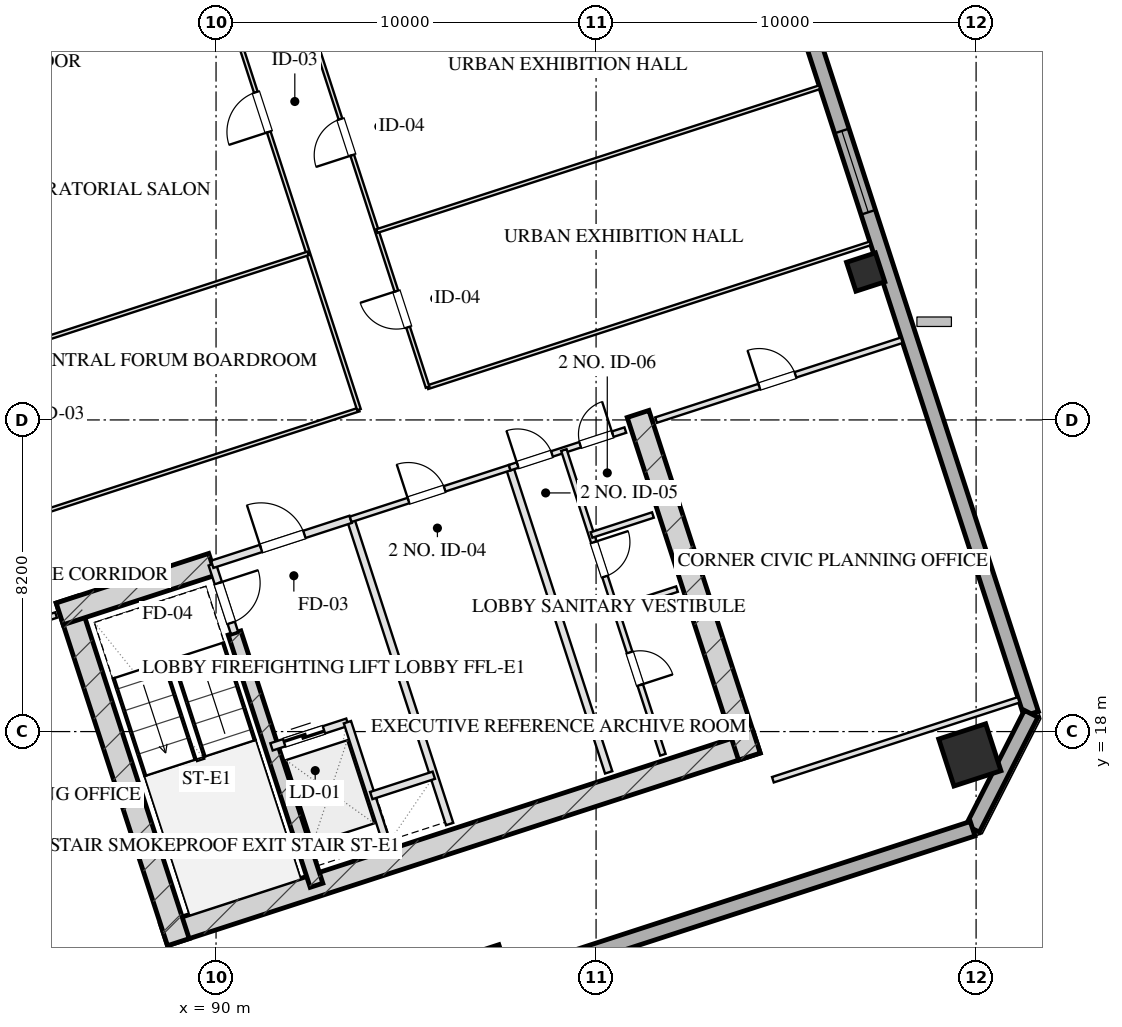
"""IFC4 building model, lengths in metres.
Left out: names, types, materials, properties, quantities, classifications, styles, units other than length and angle.
Written with IfcOpenShell. Run it as: python <this file> out.ifc"""

import sys

from ifc_helpers import new_model, si_unit, direction, frame, frame_2d, origin, origin_2d, place, context, subcontext, project, spatial, rectangle, hollow_rectangle, extrude, element, fill, save


model = new_model("IFC4")
c1 = context("Model", 3, precision=1e-05, world=origin(), true_north=direction((0.0, 1.0)))
c2 = subcontext(c1, "Body", "Model", "MODEL_VIEW")
j1 = project(units=[si_unit("LENGTHUNIT", "METRE"), si_unit("PLANEANGLEUNIT", "RADIAN")], contexts=[c1])
p1 = place(None, origin())
s1 = spatial("IfcSite", under=j1, at=p1, CompositionType="ELEMENT")
p2 = place(p1, origin())
s2 = spatial("IfcBuilding", under=s1, at=p2, CompositionType="ELEMENT")
p3 = place(p2, frame((0.0, 0.0, 142.6)))
s3 = spatial("IfcBuildingStorey", under=s2, at=p3, CompositionType="ELEMENT", Elevation=142.6)
p4 = place(p3, frame((88.63, 12.652, 0.0), z_axis=(0.0, 0.0, 1.0), x_axis=(0.95105714907, 0.309015046886, 0.0)))
e1 = element("IfcWall", 1, at=p4, inside=s3, PredefinedType="SHEAR", context=c2, shape_type="SweptSolid", body=[
    extrude(rectangle(XDim=16.4, YDim=0.6, at=frame_2d((8.2, 0.0))), origin(), (0.0, 0.0, 1.0), 3.45),
])
p5 = place(p3, frame((86.078, 21.475, 0.0), z_axis=(0.0, 0.0, 1.0), x_axis=(0.309017938678, -0.951056209472, 0.0)))
e2 = element("IfcWall", 2, at=p5, inside=s3, PredefinedType="SHEAR", context=c2, shape_type="SweptSolid", body=[
    extrude(rectangle(XDim=9.48, YDim=0.6, at=frame_2d((4.74, 0.0))), origin(), (0.0, 0.0, 1.0), 3.45),
])
p6 = place(p3, frame((101.105, 26.358, 0.0), z_axis=(0.0, 0.0, 1.0), x_axis=(0.309010370028, -0.95105866865, 0.0)))
e3 = element("IfcWall", 3, at=p6, inside=s3, PredefinedType="SHEAR", context=c2, shape_type="SweptSolid", body=[
    extrude(rectangle(XDim=9.48, YDim=0.6, at=frame_2d((4.74, 0.0))), origin(), (0.0, 0.0, 1.0), 3.45),
])
p7 = place(p3, frame((90.486, 20.594, 0.0), z_axis=(0.0, 0.0, 1.0), x_axis=(0.309020428229, -0.951055400562, 0.0)))
e4 = element("IfcWall", 4, at=p7, inside=s3, PredefinedType="SHEAR", context=c2, shape_type="SweptSolid", body=[
    extrude(rectangle(XDim=6.98, YDim=0.35, at=frame_2d((3.49, 0.0))), origin(), (0.0, 0.0, 1.0), 3.45),
])
p8 = place(p3, frame((85.886, 21.097, 0.0), z_axis=(0.0, 0.0, 1.0), x_axis=(0.951068073652, 0.308981422225, 0.0)))
e5 = element("IfcWall", 5, at=p8, inside=s3, PredefinedType="SHEAR", context=c2, shape_type="SweptSolid", body=[
    extrude(rectangle(XDim=4.22, YDim=0.6, at=frame_2d((2.11, 0.0))), origin(), (0.0, 0.0, 1.0), 3.45),
])
p9 = place(p3, frame((109.835, 17.386, 0.0), z_axis=(0.0, 0.0, 1.0), x_axis=(0.951056516295, 0.309016994375, 0.0)))
e6 = element("IfcColumn", 6, at=p9, inside=s3, PredefinedType="COLUMN", context=c2, shape_type="SweptSolid", body=[
    extrude(hollow_rectangle(XDim=1.3, YDim=1.3, WallThickness=0.045, at=origin_2d()), origin(), (0.0, 0.0, 1.0), 3.451),
])
for number, where, z_axis, x_axis in (
    (7, (107.094, 30.091, 0.0), (0.0, 0.0, 1.0), (0.951, 0.309, 0.0)),
    (8, (97.185, 11.888, 0.0), (0.0, 0.0, 1.0), (0.951, 0.309, 0.0)),
):
    element("IfcColumn", number, at=place(p3, frame(where, z_axis=z_axis, x_axis=x_axis)), inside=s3, PredefinedType="COLUMN", context=c2, shape_type="SweptSolid", body=[
        extrude(hollow_rectangle(XDim=0.8, YDim=0.8, WallThickness=0.028, at=origin_2d()), origin(), (0.0, 0.0, 1.0), 3.451),
    ])
p10 = place(p3, frame((98.224, 59.173, 0.0), z_axis=(0.0, 0.0, 1.0), x_axis=(0.309014228706, -0.951057414911, 0.0)))
e9 = element("IfcWall", 9, at=p10, inside=s3, PredefinedType="SOLIDWALL", context=c2, shape_type="SweptSolid", body=[
    extrude(rectangle(XDim=42.8, YDim=0.4, at=frame_2d((21.4, 0.0))), origin(), (0.0, 0.0, 1.0), 2.61),
])
p11 = place(p10, frame((26.675, 0.0, 0.75)))
e10 = element("IfcOpeningElement", 10, at=p11, cuts=e9, PredefinedType="OPENING", context=c2, shape_type="SweptSolid", body=[
    extrude(rectangle(XDim=2.25, YDim=1.46, at=frame_2d((1.125, 0.73))), frame((0.0, 0.21, 0.0), z_axis=(0.0, -1.0, 0.0), x_axis=(1.0, 0.0, 0.0)), (0.0, 0.0, 1.0), 0.42),
])
p12 = place(p10, frame((16.45, 0.0, 0.0)))
e11 = element("IfcOpeningElement", 11, at=p12, cuts=e9, PredefinedType="OPENING", context=c2, shape_type="SweptSolid", body=[
    extrude(rectangle(XDim=1.1, YDim=2.15, at=frame_2d((0.55, 1.075))), frame((0.0, 0.21, 0.0), z_axis=(0.0, -1.0, 0.0), x_axis=(1.0, 0.0, 0.0)), (0.0, 0.0, 1.0), 0.42),
])
p13 = place(p3, frame((111.449, 18.468, 0.0), z_axis=(0.0, 0.0, 1.0), x_axis=(-0.454019523198, -0.890991735402, 0.0)))
e12 = element("IfcWall", 12, at=p13, inside=s3, PredefinedType="SOLIDWALL", context=c2, shape_type="SweptSolid", body=[
    extrude(rectangle(XDim=3.394, YDim=0.4, at=frame_2d((1.697, 0.0))), origin(), (0.0, 0.0, 1.0), 2.61),
])
p14 = place(p3, frame((109.908, 15.444, 0.0), z_axis=(0.0, 0.0, 1.0), x_axis=(-0.951057580055, -0.30901372044, 0.0)))
e13 = element("IfcWall", 13, at=p14, inside=s3, PredefinedType="SOLIDWALL", context=c2, shape_type="SweptSolid", body=[
    extrude(rectangle(XDim=26.4, YDim=0.4, at=frame_2d((13.2, 0.0))), origin(), (0.0, 0.0, 1.0), 2.61),
])
p15 = place(p3, frame((89.899, 22.401, 0.0), z_axis=(0.0, 0.0, 1.0), x_axis=(0.308932062672, -0.951084108086, 0.0)))
e14 = element("IfcWall", 14, at=p15, inside=s3, PredefinedType="PARTITIONING", context=c2, shape_type="SweptSolid", body=[
    extrude(rectangle(XDim=1.9, YDim=0.2, at=frame_2d((0.95, 0.0))), origin(), (0.0, 0.0, 1.0), 3.175),
])
p16 = place(p15, frame((0.52, 0.0, 0.0)))
e15 = element("IfcOpeningElement", 15, at=p16, cuts=e14, PredefinedType="OPENING", context=c2, shape_type="SweptSolid", body=[
    extrude(rectangle(XDim=1.1, YDim=2.05, at=frame_2d((0.55, 1.025))), frame((0.0, 0.11, 0.0), z_axis=(0.0, -1.0, 0.0), x_axis=(1.0, 0.0, 0.0)), (0.0, 0.0, 1.0), 0.22),
])
p17 = place(p3, frame((93.542, 23.585, 0.0), z_axis=(0.0, 0.0, 1.0), x_axis=(0.309042196757, -0.951048327176, 0.0)))
e16 = element("IfcWall", 16, at=p17, inside=s3, PredefinedType="PARTITIONING", context=c2, shape_type="SweptSolid", body=[
    extrude(rectangle(XDim=8.43, YDim=0.2, at=frame_2d((4.215, 0.0))), origin(), (0.0, 0.0, 1.0), 3.175),
])
p18 = place(p3, frame((89.899, 22.401, 0.0), z_axis=(0.0, 0.0, 1.0), x_axis=(0.951046716504, 0.309047153403, 0.0)))
e17 = element("IfcWall", 17, at=p18, inside=s3, PredefinedType="PARTITIONING", context=c2, shape_type="SweptSolid", body=[
    extrude(rectangle(XDim=3.83, YDim=0.2, at=frame_2d((1.915, 0.0))), origin(), (0.0, 0.0, 1.0), 3.175),
])
p19 = place(p18, frame((1.35, 0.0, 0.0)))
e18 = element("IfcOpeningElement", 18, at=p19, cuts=e17, PredefinedType="OPENING", context=c2, shape_type="SweptSolid", body=[
    extrude(rectangle(XDim=1.2, YDim=2.05, at=frame_2d((0.6, 1.025))), frame((0.0, 0.11, 0.0), z_axis=(0.0, -1.0, 0.0), x_axis=(1.0, 0.0, 0.0)), (0.0, 0.0, 1.0), 0.22),
])
p20 = place(p3, frame((91.46, 17.598, 0.0), z_axis=(0.0, 0.0, 1.0), x_axis=(0.951062257173, 0.308999325213, 0.0)))
e19 = element("IfcWall", 19, at=p20, inside=s3, PredefinedType="PARTITIONING", context=c2, shape_type="SweptSolid", body=[
    extrude(rectangle(XDim=2.1, YDim=0.2, at=frame_2d((1.05, 0.0))), origin(), (0.0, 0.0, 1.0), 3.175),
])
p21 = place(p20, frame((0.35, 0.0, 0.0)))
e20 = element("IfcOpeningElement", 20, at=p21, cuts=e19, PredefinedType="OPENING", context=c2, shape_type="SweptSolid", body=[
    extrude(rectangle(XDim=1.1, YDim=2.05, at=frame_2d((0.55, 1.025))), frame((0.0, 0.11, 0.0), z_axis=(0.0, -1.0, 0.0), x_axis=(1.0, 0.0, 0.0)), (0.0, 0.0, 1.0), 0.22),
])
p22 = place(p3, frame((93.457, 18.247, 0.0), z_axis=(0.0, 0.0, 1.0), x_axis=(0.3089935693, -0.951064127245, 0.0)))
e21 = element("IfcWall", 21, at=p22, inside=s3, PredefinedType="PARTITIONING", context=c2, shape_type="SweptSolid", body=[
    extrude(rectangle(XDim=3.7, YDim=0.2, at=frame_2d((1.85, 0.0))), origin(), (0.0, 0.0, 1.0), 3.175),
])
p23 = place(p3, frame((94.084, 16.317, 0.0), z_axis=(0.0, 0.0, 1.0), x_axis=(0.951041328149, 0.309063734775, 0.0)))
e22 = element("IfcWall", 22, at=p23, inside=s3, PredefinedType="PARTITIONING", context=c2, shape_type="SweptSolid", body=[
    extrude(rectangle(XDim=1.73, YDim=0.2, at=frame_2d((0.865, 0.0))), origin(), (0.0, 0.0, 1.0), 3.175),
])
p24 = place(p3, frame((97.727, 24.944, 0.0), z_axis=(0.0, 0.0, 1.0), x_axis=(0.309016001439, -0.951056838919, 0.0)))
e23 = element("IfcWall", 23, at=p24, inside=s3, PredefinedType="PARTITIONING", context=c2, shape_type="SweptSolid", body=[
    extrude(rectangle(XDim=8.43, YDim=0.2, at=frame_2d((4.215, 0.0))), origin(), (0.0, 0.0, 1.0), 3.175),
])
p25 = place(p3, frame((93.542, 23.585, 0.0), z_axis=(0.0, 0.0, 1.0), x_axis=(0.951063829732, 0.308994485023, 0.0)))
e24 = element("IfcWall", 24, at=p25, inside=s3, PredefinedType="PARTITIONING", context=c2, shape_type="SweptSolid", body=[
    extrude(rectangle(XDim=4.4, YDim=0.15, at=frame_2d((2.2, 0.0))), origin(), (0.0, 0.0, 1.0), 3.175),
])
p26 = place(p25, frame((1.6, 0.0, 0.0)))
e25 = element("IfcOpeningElement", 25, at=p26, cuts=e24, PredefinedType="OPENING", context=c2, shape_type="SweptSolid", body=[
    extrude(rectangle(XDim=1.0, YDim=2.05, at=frame_2d((0.5, 1.025))), frame((0.0, 0.085, 0.0), z_axis=(0.0, -1.0, 0.0), x_axis=(1.0, 0.0, 0.0)), (0.0, 0.0, 1.0), 0.17),
])
p27 = place(p3, frame((97.727, 24.944, 0.0), z_axis=(0.0, 0.0, 1.0), x_axis=(0.951036872128, 0.309077446369, 0.0)))
e26 = element("IfcWall", 26, at=p27, inside=s3, PredefinedType="PARTITIONING", context=c2, shape_type="SweptSolid", body=[
    extrude(rectangle(XDim=3.2, YDim=0.15, at=frame_2d((1.6, 0.0))), origin(), (0.0, 0.0, 1.0), 3.175),
])
p28 = place(p27, frame((0.22, 0.0, 0.0)))
e27 = element("IfcOpeningElement", 27, at=p28, cuts=e26, PredefinedType="OPENING", context=c2, shape_type="SweptSolid", body=[
    extrude(rectangle(XDim=0.95, YDim=2.05, at=frame_2d((0.475, 1.025))), frame((0.0, 0.085, 0.0), z_axis=(0.0, -1.0, 0.0), x_axis=(1.0, 0.0, 0.0)), (0.0, 0.0, 1.0), 0.17),
])
p29 = place(p27, frame((1.95, 0.0, 0.0)))
e28 = element("IfcOpeningElement", 28, at=p29, cuts=e26, PredefinedType="OPENING", context=c2, shape_type="SweptSolid", body=[
    extrude(rectangle(XDim=0.9, YDim=2.05, at=frame_2d((0.45, 1.025))), frame((0.0, 0.085, 0.0), z_axis=(0.0, -1.0, 0.0), x_axis=(1.0, 0.0, 0.0)), (0.0, 0.0, 1.0), 0.17),
])
p30 = place(p3, frame((99.153, 25.408, 0.0), z_axis=(0.0, 0.0, 1.0), x_axis=(0.309016001439, -0.951056838919, 0.0)))
e29 = element("IfcWall", 29, at=p30, inside=s3, PredefinedType="PARTITIONING", context=c2, shape_type="SweptSolid", body=[
    extrude(rectangle(XDim=8.43, YDim=0.15, at=frame_2d((4.215, 0.0))), origin(), (0.0, 0.0, 1.0), 3.175),
])
p31 = place(p30, frame((2.55, 0.0, 0.0)))
e30 = element("IfcOpeningElement", 30, at=p31, cuts=e29, PredefinedType="OPENING", context=c2, shape_type="SweptSolid", body=[
    extrude(rectangle(XDim=0.95, YDim=2.05, at=frame_2d((0.475, 1.025))), frame((0.0, 0.085, 0.0), z_axis=(0.0, -1.0, 0.0), x_axis=(1.0, 0.0, 0.0)), (0.0, 0.0, 1.0), 0.17),
])
p32 = place(p30, frame((5.6, 0.0, 0.0)))
e31 = element("IfcOpeningElement", 31, at=p32, cuts=e29, PredefinedType="OPENING", context=c2, shape_type="SweptSolid", body=[
    extrude(rectangle(XDim=0.9, YDim=2.05, at=frame_2d((0.45, 1.025))), frame((0.0, 0.085, 0.0), z_axis=(0.0, -1.0, 0.0), x_axis=(1.0, 0.0, 0.0)), (0.0, 0.0, 1.0), 0.17),
])
for number, where, z_axis, x_axis in (
    (32, (100.513, 21.223, 0.0), (0.0, 0.0, 1.0), (0.951, 0.309, 0.0)),
    (33, (99.879, 23.173, 0.0), (0.0, 0.0, 1.0), (0.951, 0.309, 0.0)),
):
    element("IfcWall", number, at=place(p3, frame(where, z_axis=z_axis, x_axis=x_axis)), inside=s3, PredefinedType="PARTITIONING", context=c2, shape_type="SweptSolid", body=[
        extrude(rectangle(XDim=1.7, YDim=0.15, at=frame_2d((0.85, 0.0))), origin(), (0.0, 0.0, 1.0), 3.175),
    ])
p33 = place(p3, frame((78.753, 18.78, 0.0), z_axis=(0.0, 0.0, 1.0), x_axis=(0.951060977215, 0.309003264738, 0.0)))
e34 = element("IfcWall", 34, at=p33, inside=s3, PredefinedType="PARTITIONING", context=c2, shape_type="SweptSolid", body=[
    extrude(rectangle(XDim=7.4, YDim=0.15, at=frame_2d((3.7, 0.0))), origin(), (0.0, 0.0, 1.0), 3.175),
])
p34 = place(p33, frame((3.108, 0.0, 0.0)))
e35 = element("IfcOpeningElement", 35, at=p34, cuts=e34, PredefinedType="OPENING", context=c2, shape_type="SweptSolid", body=[
    extrude(rectangle(XDim=1.0, YDim=2.05, at=frame_2d((0.5, 1.025))), frame((0.0, 0.085, 0.0), z_axis=(0.0, -1.0, 0.0), x_axis=(1.0, 0.0, 0.0)), (0.0, 0.0, 1.0), 0.17),
])
p35 = place(p3, frame((104.653, 16.733, 0.0), z_axis=(0.0, 0.0, 1.0), x_axis=(0.951054383043, 0.309023559774, 0.0)))
e36 = element("IfcWall", 36, at=p35, inside=s3, PredefinedType="PARTITIONING", context=c2, shape_type="SweptSolid", body=[
    extrude(rectangle(XDim=6.8, YDim=0.15, at=frame_2d((3.4, 0.0))), origin(), (0.0, 0.0, 1.0), 3.175),
])
p36 = place(p3, frame((101.578, 26.196, 0.0), z_axis=(0.0, 0.0, 1.0), x_axis=(0.951064934653, 0.308991084134, 0.0)))
e37 = element("IfcWall", 37, at=p36, inside=s3, PredefinedType="PARTITIONING", context=c2, shape_type="SweptSolid", body=[
    extrude(rectangle(XDim=6.8, YDim=0.15, at=frame_2d((3.4, 0.0))), origin(), (0.0, 0.0, 1.0), 3.175),
])
p37 = place(p36, frame((2.856, 0.0, 0.0)))
e38 = element("IfcOpeningElement", 38, at=p37, cuts=e37, PredefinedType="OPENING", context=c2, shape_type="SweptSolid", body=[
    extrude(rectangle(XDim=1.0, YDim=2.05, at=frame_2d((0.5, 1.025))), frame((0.0, 0.085, 0.0), z_axis=(0.0, -1.0, 0.0), x_axis=(1.0, 0.0, 0.0)), (0.0, 0.0, 1.0), 0.17),
])
p38 = place(p3, frame((85.248, 23.708, 0.0), z_axis=(0.0, 0.0, 1.0), x_axis=(0.951059123431, 0.309008970321, 0.0)))
e39 = element("IfcWall", 39, at=p38, inside=s3, PredefinedType="MOVABLE", context=c2, shape_type="SweptSolid", body=[
    extrude(rectangle(XDim=8.95, YDim=0.1, at=frame_2d((4.475, 0.0))), origin(), (0.0, 0.0, 1.0), 3.175),
])
p39 = place(p3, frame((95.567, 27.061, 0.0), z_axis=(0.0, 0.0, 1.0), x_axis=(0.9510516424, 0.30903199428, 0.0)))
e40 = element("IfcWall", 40, at=p39, inside=s3, PredefinedType="MOVABLE", context=c2, shape_type="SweptSolid", body=[
    extrude(rectangle(XDim=12.25, YDim=0.1, at=frame_2d((6.125, 0.0))), origin(), (0.0, 0.0, 1.0), 3.175),
])
p40 = place(p3, frame((93.76, 26.473, 0.0), z_axis=(0.0, 0.0, 1.0), x_axis=(-0.309004459387, 0.951060589068, 0.0)))
e41 = element("IfcWall", 41, at=p40, inside=s3, PredefinedType="MOVABLE", context=c2, shape_type="SweptSolid", body=[
    extrude(rectangle(XDim=16.64, YDim=0.1, at=frame_2d((8.32, 0.0))), origin(), (0.0, 0.0, 1.0), 3.175),
])
p41 = place(p40, frame((7.68, 0.0, 0.0)))
e42 = element("IfcOpeningElement", 42, at=p41, cuts=e41, PredefinedType="OPENING", context=c2, shape_type="SweptSolid", body=[
    extrude(rectangle(XDim=1.1, YDim=2.05, at=frame_2d((0.55, 1.025))), frame((0.0, 0.06, 0.0), z_axis=(0.0, -1.0, 0.0), x_axis=(1.0, 0.0, 0.0)), (0.0, 0.0, 1.0), 0.12),
])
p42 = place(p3, frame((95.567, 27.061, 0.0), z_axis=(0.0, 0.0, 1.0), x_axis=(-0.30901773025, 0.951056277195, 0.0)))
e43 = element("IfcWall", 43, at=p42, inside=s3, PredefinedType="MOVABLE", context=c2, shape_type="SweptSolid", body=[
    extrude(rectangle(XDim=16.64, YDim=0.1, at=frame_2d((8.32, 0.0))), origin(), (0.0, 0.0, 1.0), 3.175),
])
p43 = place(p42, frame((1.66, 0.0, 0.0)))
e44 = element("IfcOpeningElement", 44, at=p43, cuts=e43, PredefinedType="OPENING", context=c2, shape_type="SweptSolid", body=[
    extrude(rectangle(XDim=1.0, YDim=2.05, at=frame_2d((0.5, 1.025))), frame((0.0, 0.06, 0.0), z_axis=(0.0, -1.0, 0.0), x_axis=(1.0, 0.0, 0.0)), (0.0, 0.0, 1.0), 0.12),
])
p44 = place(p42, frame((6.42, 0.0, 0.0)))
e45 = element("IfcOpeningElement", 45, at=p44, cuts=e43, PredefinedType="OPENING", context=c2, shape_type="SweptSolid", body=[
    extrude(rectangle(XDim=1.0, YDim=2.05, at=frame_2d((0.5, 1.025))), frame((0.0, 0.06, 0.0), z_axis=(0.0, -1.0, 0.0), x_axis=(1.0, 0.0, 0.0)), (0.0, 0.0, 1.0), 0.12),
])
p45 = place(p42, frame((12.58, 0.0, 0.0)))
e46 = element("IfcOpeningElement", 46, at=p45, cuts=e43, PredefinedType="OPENING", context=c2, shape_type="SweptSolid", body=[
    extrude(rectangle(XDim=1.0, YDim=2.05, at=frame_2d((0.5, 1.025))), frame((0.0, 0.06, 0.0), z_axis=(0.0, -1.0, 0.0), x_axis=(1.0, 0.0, 0.0)), (0.0, 0.0, 1.0), 0.12),
])
p46 = place(p3, frame((83.913, 27.816, 0.0), z_axis=(0.0, 0.0, 1.0), x_axis=(0.951059123431, 0.309008970321, 0.0)))
e47 = element("IfcWall", 47, at=p46, inside=s3, PredefinedType="MOVABLE", context=c2, shape_type="SweptSolid", body=[
    extrude(rectangle(XDim=8.95, YDim=0.1, at=frame_2d((4.475, 0.0))), origin(), (0.0, 0.0, 1.0), 3.175),
])
p47 = place(p3, frame((81.441, 35.425, 0.0), z_axis=(0.0, 0.0, 1.0), x_axis=(0.951056518616, 0.309016987233, 0.0)))
e48 = element("IfcWall", 48, at=p47, inside=s3, PredefinedType="MOVABLE", context=c2, shape_type="SweptSolid", body=[
    extrude(rectangle(XDim=8.95, YDim=0.1, at=frame_2d((4.475, 0.0))), origin(), (0.0, 0.0, 1.0), 3.175),
])
p48 = place(p3, frame((94.232, 31.169, 0.0), z_axis=(0.0, 0.0, 1.0), x_axis=(0.95105749975, 0.309013967595, 0.0)))
e49 = element("IfcWall", 49, at=p48, inside=s3, PredefinedType="MOVABLE", context=c2, shape_type="SweptSolid", body=[
    extrude(rectangle(XDim=12.25, YDim=0.1, at=frame_2d((6.125, 0.0))), origin(), (0.0, 0.0, 1.0), 3.175),
])
p49 = place(p11, origin())
e50 = element("IfcWindow", 50, at=p49, inside=s3, PartitioningType="TRIPLE_PANEL_VERTICAL", PredefinedType="WINDOW", context=c2, shape_type="SweptSolid", body=[
    extrude(rectangle(XDim=2.25, YDim=1.46, at=frame_2d((1.125, 0.73))), frame((0.0, 0.03, 0.0), z_axis=(0.0, -1.0, 0.0), x_axis=(1.0, 0.0, 0.0)), (0.0, 0.0, 1.0), 0.06),
])
fill(e10, e50)
p50 = place(p16, origin())
e51 = element("IfcDoor", 51, at=p50, inside=s3, OperationType="SINGLE_SWING_LEFT", PredefinedType="DOOR", context=c2, shape_type="SweptSolid", body=[
    extrude(rectangle(XDim=1.1, YDim=2.05, at=frame_2d((0.55, 1.025))), frame((0.0, 0.025, 0.0), z_axis=(0.0, -1.0, 0.0), x_axis=(1.0, 0.0, 0.0)), (0.0, 0.0, 1.0), 0.05),
])
fill(e15, e51)
p51 = place(p19, origin())
e52 = element("IfcDoor", 52, at=p51, inside=s3, OperationType="SINGLE_SWING_LEFT", PredefinedType="DOOR", context=c2, shape_type="SweptSolid", body=[
    extrude(rectangle(XDim=1.2, YDim=2.05, at=frame_2d((0.6, 1.025))), frame((0.0, 0.025, 0.0), z_axis=(0.0, -1.0, 0.0), x_axis=(1.0, 0.0, 0.0)), (0.0, 0.0, 1.0), 0.05),
])
fill(e18, e52)
p52 = place(p21, origin())
e53 = element("IfcDoor", 53, at=p52, inside=s3, OperationType="DOUBLE_DOOR_SLIDING", PredefinedType="DOOR", context=c2, shape_type="SweptSolid", body=[
    extrude(rectangle(XDim=1.1, YDim=2.05, at=frame_2d((0.55, 1.025))), frame((0.0, 0.025, 0.0), z_axis=(0.0, -1.0, 0.0), x_axis=(1.0, 0.0, 0.0)), (0.0, 0.0, 1.0), 0.05),
])
fill(e20, e53)
p53 = place(p26, origin())
e54 = element("IfcDoor", 54, at=p53, inside=s3, OperationType="SINGLE_SWING_LEFT", PredefinedType="DOOR", context=c2, shape_type="SweptSolid", body=[
    extrude(rectangle(XDim=1.0, YDim=2.05, at=frame_2d((0.5, 1.025))), frame((0.0, 0.025, 0.0), z_axis=(0.0, -1.0, 0.0), x_axis=(1.0, 0.0, 0.0)), (0.0, 0.0, 1.0), 0.05),
])
fill(e25, e54)
p54 = place(p28, origin())
e55 = element("IfcDoor", 55, at=p54, inside=s3, OperationType="SINGLE_SWING_LEFT", PredefinedType="DOOR", context=c2, shape_type="SweptSolid", body=[
    extrude(rectangle(XDim=0.95, YDim=2.05, at=frame_2d((0.475, 1.025))), frame((0.0, 0.025, 0.0), z_axis=(0.0, -1.0, 0.0), x_axis=(1.0, 0.0, 0.0)), (0.0, 0.0, 1.0), 0.05),
])
fill(e27, e55)
p55 = place(p29, origin())
e56 = element("IfcDoor", 56, at=p55, inside=s3, OperationType="SINGLE_SWING_RIGHT", PredefinedType="DOOR", context=c2, shape_type="SweptSolid", body=[
    extrude(rectangle(XDim=0.9, YDim=2.05, at=frame_2d((0.45, 1.025))), frame((0.0, 0.025, 0.0), z_axis=(0.0, -1.0, 0.0), x_axis=(1.0, 0.0, 0.0)), (0.0, 0.0, 1.0), 0.05),
])
fill(e28, e56)
p56 = place(p31, origin())
e57 = element("IfcDoor", 57, at=p56, inside=s3, OperationType="SINGLE_SWING_LEFT", PredefinedType="DOOR", context=c2, shape_type="SweptSolid", body=[
    extrude(rectangle(XDim=0.95, YDim=2.05, at=frame_2d((0.475, 1.025))), frame((0.0, 0.025, 0.0), z_axis=(0.0, -1.0, 0.0), x_axis=(1.0, 0.0, 0.0)), (0.0, 0.0, 1.0), 0.05),
])
fill(e30, e57)
p57 = place(p32, origin())
e58 = element("IfcDoor", 58, at=p57, inside=s3, OperationType="SINGLE_SWING_RIGHT", PredefinedType="DOOR", context=c2, shape_type="SweptSolid", body=[
    extrude(rectangle(XDim=0.9, YDim=2.05, at=frame_2d((0.45, 1.025))), frame((0.0, 0.025, 0.0), z_axis=(0.0, -1.0, 0.0), x_axis=(1.0, 0.0, 0.0)), (0.0, 0.0, 1.0), 0.05),
])
fill(e31, e58)
p58 = place(p37, origin())
e59 = element("IfcDoor", 59, at=p58, inside=s3, OperationType="SINGLE_SWING_LEFT", PredefinedType="DOOR", context=c2, shape_type="SweptSolid", body=[
    extrude(rectangle(XDim=1.0, YDim=2.05, at=frame_2d((0.5, 1.025))), frame((0.0, 0.025, 0.0), z_axis=(0.0, -1.0, 0.0), x_axis=(1.0, 0.0, 0.0)), (0.0, 0.0, 1.0), 0.05),
])
fill(e38, e59)
p59 = place(p41, origin())
e60 = element("IfcDoor", 60, at=p59, inside=s3, OperationType="SINGLE_SWING_LEFT", PredefinedType="DOOR", context=c2, shape_type="SweptSolid", body=[
    extrude(rectangle(XDim=1.1, YDim=2.05, at=frame_2d((0.55, 1.025))), frame((0.0, 0.025, 0.0), z_axis=(0.0, -1.0, 0.0), x_axis=(1.0, 0.0, 0.0)), (0.0, 0.0, 1.0), 0.05),
])
fill(e42, e60)
p60 = place(p43, origin())
e61 = element("IfcDoor", 61, at=p60, inside=s3, OperationType="SINGLE_SWING_RIGHT", PredefinedType="DOOR", context=c2, shape_type="SweptSolid", body=[
    extrude(rectangle(XDim=1.0, YDim=2.05, at=frame_2d((0.5, 1.025))), frame((0.0, 0.025, 0.0), z_axis=(0.0, -1.0, 0.0), x_axis=(1.0, 0.0, 0.0)), (0.0, 0.0, 1.0), 0.05),
])
fill(e44, e61)
p61 = place(p44, origin())
e62 = element("IfcDoor", 62, at=p61, inside=s3, OperationType="SINGLE_SWING_LEFT", PredefinedType="DOOR", context=c2, shape_type="SweptSolid", body=[
    extrude(rectangle(XDim=1.0, YDim=2.05, at=frame_2d((0.5, 1.025))), frame((0.0, 0.025, 0.0), z_axis=(0.0, -1.0, 0.0), x_axis=(1.0, 0.0, 0.0)), (0.0, 0.0, 1.0), 0.05),
])
fill(e45, e62)
save(model, sys.argv[1])
